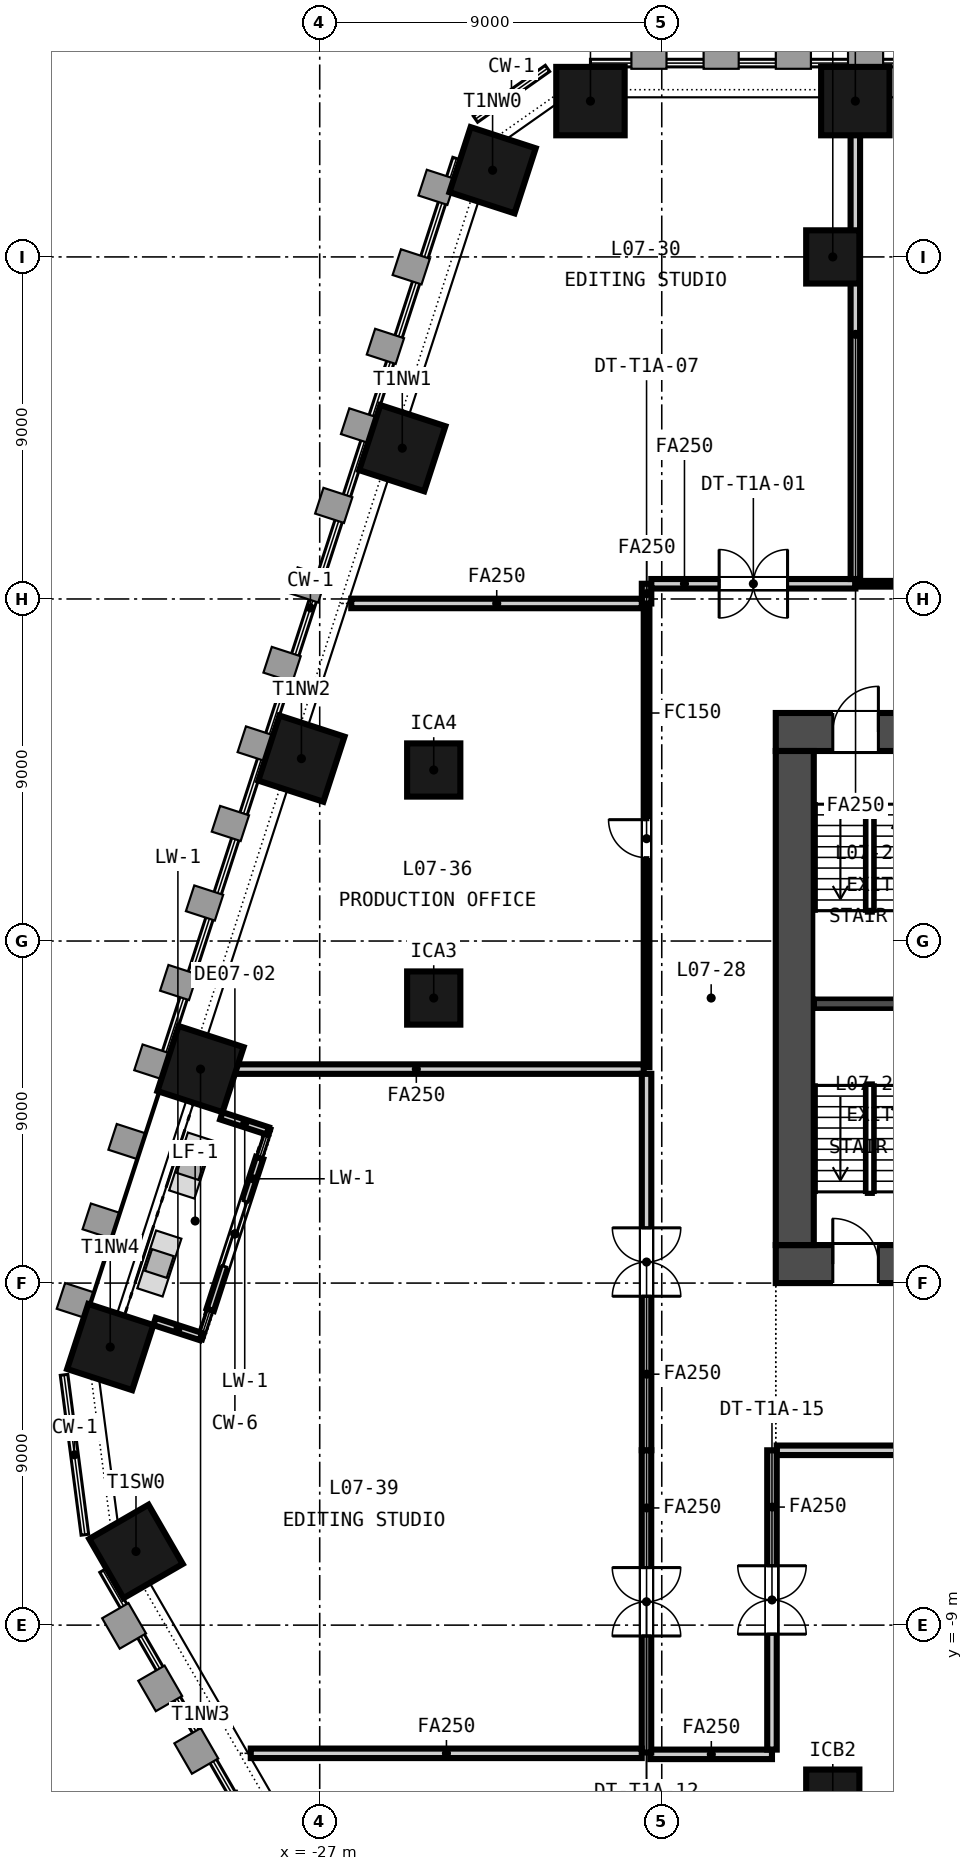
"""IFC4 building model, lengths in metres.
Left out: names, types, materials, properties, quantities, classifications, styles, units other than length and angle.
Written with IfcOpenShell. Run it as: python <this file> out.ifc"""

import sys

from ifc_helpers import new_model, si_unit, direction, frame, frame_2d, origin, origin_2d, place, context, subcontext, project, spatial, rectangle, extrude, element, fill, save


model = new_model("IFC4")
c1 = context("Model", 3, precision=1e-05, world=origin(), true_north=direction((0.0, 1.0)))
c2 = subcontext(c1, "Body", "Model", "MODEL_VIEW")
j1 = project(units=[si_unit("LENGTHUNIT", "METRE"), si_unit("PLANEANGLEUNIT", "RADIAN")], contexts=[c1])
p1 = place(None, origin())
s1 = spatial("IfcSite", under=j1, at=p1, CompositionType="ELEMENT")
p2 = place(p1, origin())
s2 = spatial("IfcBuilding", under=s1, at=p2, CompositionType="ELEMENT")
p3 = place(p2, frame((0.0, 0.0, 39.65)))
s3 = spatial("IfcBuildingStorey", under=s2, at=p3, CompositionType="ELEMENT", Elevation=39.65)
p4 = place(p3, frame((-15.0, 0.5, -0.15), z_axis=(0.0, 0.0, 1.0), x_axis=(1.0, 0.0, 0.0)))
e1 = element("IfcWall", 1, at=p4, inside=s3, PredefinedType="SOLIDWALL", context=c2, shape_type="SweptSolid", body=[
    extrude(rectangle(XDim=30.0, YDim=1.0, at=frame_2d((15.0, 0.0))), origin(), (0.0, 0.0, 1.0), 3.65),
])
p5 = place(p4, frame((5.8, 0.0, 0.15)))
e2 = element("IfcOpeningElement", 2, at=p5, cuts=e1, PredefinedType="OPENING", context=c2, shape_type="SweptSolid", body=[
    extrude(rectangle(XDim=2.4, YDim=2.4, at=frame_2d((1.2, 1.2))), frame((0.0, 0.51, 0.0), z_axis=(0.0, -1.0, 0.0), x_axis=(1.0, 0.0, 0.0)), (0.0, 0.0, 1.0), 1.02),
])
p6 = place(p4, frame((13.8, 0.0, 0.15)))
e3 = element("IfcOpeningElement", 3, at=p6, cuts=e1, PredefinedType="OPENING", context=c2, shape_type="SweptSolid", body=[
    extrude(rectangle(XDim=2.4, YDim=2.4, at=frame_2d((1.2, 1.2))), frame((0.0, 0.51, 0.0), z_axis=(0.0, -1.0, 0.0), x_axis=(1.0, 0.0, 0.0)), (0.0, 0.0, 1.0), 1.02),
])
p7 = place(p4, frame((21.8, 0.0, 0.15)))
e4 = element("IfcOpeningElement", 4, at=p7, cuts=e1, PredefinedType="OPENING", context=c2, shape_type="SweptSolid", body=[
    extrude(rectangle(XDim=2.4, YDim=2.4, at=frame_2d((1.2, 1.2))), frame((0.0, 0.51, 0.0), z_axis=(0.0, -1.0, 0.0), x_axis=(1.0, 0.0, 0.0)), (0.0, 0.0, 1.0), 1.02),
])
p8 = place(p4, frame((1.5, 0.0, 0.15)))
e5 = element("IfcOpeningElement", 5, at=p8, cuts=e1, PredefinedType="OPENING", context=c2, shape_type="SweptSolid", body=[
    extrude(rectangle(XDim=1.2, YDim=2.1, at=frame_2d((0.6, 1.05))), frame((0.0, 0.51, 0.0), z_axis=(0.0, -1.0, 0.0), x_axis=(1.0, 0.0, 0.0)), (0.0, 0.0, 1.0), 1.02),
])
p9 = place(p4, frame((27.3, 0.0, 0.15)))
e6 = element("IfcOpeningElement", 6, at=p9, cuts=e1, PredefinedType="OPENING", context=c2, shape_type="SweptSolid", body=[
    extrude(rectangle(XDim=1.2, YDim=2.1, at=frame_2d((0.6, 1.05))), frame((0.0, 0.51, 0.0), z_axis=(0.0, -1.0, 0.0), x_axis=(1.0, 0.0, 0.0)), (0.0, 0.0, 1.0), 1.02),
])
p10 = place(p3, frame((-15.0, 14.5, -0.15), z_axis=(0.0, 0.0, 1.0), x_axis=(1.0, 0.0, 0.0)))
e7 = element("IfcWall", 7, at=p10, inside=s3, PredefinedType="SOLIDWALL", context=c2, shape_type="SweptSolid", body=[
    extrude(rectangle(XDim=30.0, YDim=1.0, at=frame_2d((15.0, 0.0))), origin(), (0.0, 0.0, 1.0), 3.65),
])
p11 = place(p10, frame((9.25, 0.0, 0.15)))
e8 = element("IfcOpeningElement", 8, at=p11, cuts=e7, PredefinedType="OPENING", context=c2, shape_type="SweptSolid", body=[
    extrude(rectangle(XDim=1.5, YDim=2.1, at=frame_2d((0.75, 1.05))), frame((0.0, 0.51, 0.0), z_axis=(0.0, -1.0, 0.0), x_axis=(1.0, 0.0, 0.0)), (0.0, 0.0, 1.0), 1.02),
])
p12 = place(p10, frame((19.4, 0.0, 0.15)))
e9 = element("IfcOpeningElement", 9, at=p12, cuts=e7, PredefinedType="OPENING", context=c2, shape_type="SweptSolid", body=[
    extrude(rectangle(XDim=1.5, YDim=2.1, at=frame_2d((0.75, 1.05))), frame((0.0, 0.51, 0.0), z_axis=(0.0, -1.0, 0.0), x_axis=(1.0, 0.0, 0.0)), (0.0, 0.0, 1.0), 1.02),
])
p13 = place(p10, frame((1.5, 0.0, 0.15)))
e10 = element("IfcOpeningElement", 10, at=p13, cuts=e7, PredefinedType="OPENING", context=c2, shape_type="SweptSolid", body=[
    extrude(rectangle(XDim=1.2, YDim=2.1, at=frame_2d((0.6, 1.05))), frame((0.0, 0.51, 0.0), z_axis=(0.0, -1.0, 0.0), x_axis=(1.0, 0.0, 0.0)), (0.0, 0.0, 1.0), 1.02),
])
p14 = place(p10, frame((27.3, 0.0, 0.15)))
e11 = element("IfcOpeningElement", 11, at=p14, cuts=e7, PredefinedType="OPENING", context=c2, shape_type="SweptSolid", body=[
    extrude(rectangle(XDim=1.2, YDim=2.1, at=frame_2d((0.6, 1.05))), frame((0.0, 0.51, 0.0), z_axis=(0.0, -1.0, 0.0), x_axis=(1.0, 0.0, 0.0)), (0.0, 0.0, 1.0), 1.02),
])
p15 = place(p3, frame((-14.5, 1.0, -0.15), z_axis=(0.0, 0.0, 1.0), x_axis=(0.0, 1.0, 0.0)))
e12 = element("IfcWall", 12, at=p15, inside=s3, PredefinedType="SOLIDWALL", context=c2, shape_type="SweptSolid", body=[
    extrude(rectangle(XDim=13.0, YDim=1.0, at=frame_2d((6.5, 0.0))), origin(), (0.0, 0.0, 1.0), 3.65),
])
for number, where, z_axis, x_axis in (
    (13, (-12.907, 31.1, -0.15), (0.0, 0.0, 1.0), (-1.0, 0.0, 0.0)),
    (14, (-19.876, 31.1, -0.15), (0.0, 0.0, 1.0), (-1.0, 0.0, 0.0)),
    (15, (-22.451, 29.281, -0.15), (0.0, 0.0, 1.0), (-0.309, -0.951, 0.0)),
    (16, (-24.827, 21.968, -0.15), (0.0, 0.0, 1.0), (-0.309, -0.951, 0.0)),
    (17, (-27.482, 13.799, -0.15), (0.0, 0.0, 1.0), (-0.309, -0.951, 0.0)),
    (18, (-30.136, 5.63, -0.15), (0.0, 0.0, 1.0), (-0.309, -0.951, 0.0)),
    (19, (-32.512, -1.683, -0.15), (0.0, 0.0, 1.0), (-0.309, -0.951, 0.0)),
    (20, (-31.834, -7.061, -0.15), (0.0, 0.0, 1.0), (0.5, -0.866, 0.0)),
):
    element("IfcColumn", number, at=place(p3, frame(where, z_axis=z_axis, x_axis=x_axis)), inside=s3, PredefinedType="COLUMN", context=c2, shape_type="SweptSolid", body=[
        extrude(rectangle(XDim=1.8, YDim=1.8, at=origin_2d()), origin(), (0.0, 0.0, 1.0), 3.65),
    ])
for number, where, z_axis, x_axis in (
    (21, (-24.0, 7.5, -0.15), (0.0, 0.0, 1.0), (1.0, 0.0, 0.0)),
    (22, (-24.0, 13.5, -0.15), (0.0, 0.0, 1.0), (1.0, 0.0, 0.0)),
    (23, (-13.5, -13.5, -0.15), (0.0, 0.0, 1.0), (1.0, 0.0, 0.0)),
    (24, (-13.5, 27.0, -0.15), (0.0, 0.0, 1.0), (1.0, 0.0, 0.0)),
):
    element("IfcColumn", number, at=place(p3, frame(where, z_axis=z_axis, x_axis=x_axis)), inside=s3, PredefinedType="COLUMN", context=c2, shape_type="SweptSolid", body=[
        extrude(rectangle(XDim=1.4, YDim=1.4, at=origin_2d()), origin(), (0.0, 0.0, 1.0), 3.65),
    ])
p16 = place(p3, frame((-28.583, 3.291, 0.0), z_axis=(0.0, 0.0, 1.0), x_axis=(-0.30901640812, -0.951056706781, 0.0)))
e25 = element("IfcWall", 25, at=p16, inside=s3, PredefinedType="SOLIDWALL", context=c2, shape_type="SweptSolid", body=[
    extrude(rectangle(XDim=4.2, YDim=0.2, at=frame_2d((2.1, 0.0))), origin(), (0.0, 0.0, 1.0), 2.9),
])
p17 = place(p16, frame((1.2, 0.0, 0.0)))
e26 = element("IfcOpeningElement", 26, at=p17, cuts=e25, PredefinedType="OPENING", context=c2, shape_type="SweptSolid", body=[
    extrude(rectangle(XDim=1.8, YDim=2.4, at=frame_2d((0.9, 1.2))), frame((0.0, 0.11, 0.0), z_axis=(0.0, -1.0, 0.0), x_axis=(1.0, 0.0, 0.0)), (0.0, 0.0, 1.0), 0.22),
])
p18 = place(p3, frame((-29.589, 4.401, 0.0), z_axis=(0.0, 0.0, 1.0), x_axis=(0.951052235057, -0.30903017036, 0.0)))
e27 = element("IfcWall", 27, at=p18, inside=s3, PredefinedType="SOLIDWALL", context=c2, shape_type="SweptSolid", body=[
    extrude(rectangle(XDim=1.284, YDim=0.2, at=frame_2d((0.642, 0.0))), origin(), (0.0, 0.0, 1.0), 3.05),
])
p19 = place(p3, frame((-31.347, -1.01, 0.0), z_axis=(0.0, 0.0, 1.0), x_axis=(0.951070391529, -0.308974287532, 0.0)))
e28 = element("IfcWall", 28, at=p19, inside=s3, PredefinedType="SOLIDWALL", context=c2, shape_type="SweptSolid", body=[
    extrude(rectangle(XDim=1.284, YDim=0.2, at=frame_2d((0.642, 0.0))), origin(), (0.0, 0.0, 1.0), 3.05),
])
p20 = place(p3, frame((-14.0, 7.35, -0.15), z_axis=(0.0, 0.0, 1.0), x_axis=(1.0, 0.0, 0.0)))
e29 = element("IfcWall", 29, at=p20, inside=s3, PredefinedType="SOLIDWALL", context=c2, shape_type="SweptSolid", body=[
    extrude(rectangle(XDim=2.95, YDim=0.3, at=frame_2d((1.475, 0.0))), origin(), (0.0, 0.0, 1.0), 3.65),
])
p21 = place(p3, frame((10.192, -4.4, 0.0), z_axis=(0.0, 0.0, 1.0), x_axis=(-1.0, 0.0, 0.0)))
e30 = element("IfcWall", 30, at=p21, inside=s3, PredefinedType="PARTITIONING", context=c2, shape_type="SweptSolid", body=[
    extrude(rectangle(XDim=25.167, YDim=0.25, at=frame_2d((12.583, 0.0))), origin(), (0.0, 0.0, 1.0), 2.741),
])
p22 = place(p21, frame((11.696, 0.0, 0.0)))
e31 = element("IfcOpeningElement", 31, at=p22, cuts=e30, PredefinedType="OPENING", context=c2, shape_type="SweptSolid", body=[
    extrude(rectangle(XDim=1.8, YDim=2.1, at=frame_2d((0.9, 1.05))), frame((0.0, 0.135, 0.0), z_axis=(0.0, -1.0, 0.0), x_axis=(1.0, 0.0, 0.0)), (0.0, 0.0, 1.0), 0.27),
])
p23 = place(p3, frame((-15.1, -12.4, 0.0), z_axis=(0.0, 0.0, 1.0), x_axis=(-1.0, 0.0, 0.0)))
e32 = element("IfcWall", 32, at=p23, inside=s3, PredefinedType="PARTITIONING", context=c2, shape_type="SweptSolid", body=[
    extrude(rectangle(XDim=3.202, YDim=0.25, at=frame_2d((1.601, 0.0))), origin(), (0.0, 0.0, 1.0), 2.741),
])
p24 = place(p3, frame((-15.1, -4.4, 0.0), z_axis=(0.0, 0.0, 1.0), x_axis=(0.0, -1.0, 0.0)))
e33 = element("IfcWall", 33, at=p24, inside=s3, PredefinedType="PARTITIONING", context=c2, shape_type="SweptSolid", body=[
    extrude(rectangle(XDim=7.875, YDim=0.25, at=frame_2d((3.938, 0.0))), origin(), (0.0, 0.0, 1.0), 2.741),
])
p25 = place(p24, frame((3.038, 0.0, 0.0)))
e34 = element("IfcOpeningElement", 34, at=p25, cuts=e33, PredefinedType="OPENING", context=c2, shape_type="SweptSolid", body=[
    extrude(rectangle(XDim=1.8, YDim=2.1, at=frame_2d((0.9, 1.05))), frame((0.0, 0.135, 0.0), z_axis=(0.0, -1.0, 0.0), x_axis=(1.0, 0.0, 0.0)), (0.0, 0.0, 1.0), 0.27),
])
p26 = place(p3, frame((-18.4, 17.881, 0.0), z_axis=(0.0, 0.0, 1.0), x_axis=(0.0, 1.0, 0.0)))
e35 = element("IfcWall", 35, at=p26, inside=s3, PredefinedType="PARTITIONING", context=c2, shape_type="SweptSolid", body=[
    extrude(rectangle(XDim=0.519, YDim=0.25, at=frame_2d((0.259, 0.0))), origin(), (0.0, 0.0, 1.0), 2.741),
])
p27 = place(p3, frame((-18.275, 18.4, 0.0), z_axis=(0.0, 0.0, 1.0), x_axis=(1.0, 0.0, 0.0)))
e36 = element("IfcWall", 36, at=p27, inside=s3, PredefinedType="PARTITIONING", context=c2, shape_type="SweptSolid", body=[
    extrude(rectangle(XDim=5.37, YDim=0.25, at=frame_2d((2.685, 0.0))), origin(), (0.0, 0.0, 1.0), 2.741),
])
p28 = place(p27, frame((1.785, 0.0, 0.0)))
e37 = element("IfcOpeningElement", 37, at=p28, cuts=e36, PredefinedType="OPENING", context=c2, shape_type="SweptSolid", body=[
    extrude(rectangle(XDim=1.8, YDim=2.1, at=frame_2d((0.9, 1.05))), frame((0.0, 0.135, 0.0), z_axis=(0.0, -1.0, 0.0), x_axis=(1.0, 0.0, 0.0)), (0.0, 0.0, 1.0), 0.27),
])
p29 = place(p3, frame((-26.17, 17.883, 0.0), z_axis=(0.0, 0.0, 1.0), x_axis=(0.999999975014, -0.00022354218, 0.0)))
e38 = element("IfcWall", 38, at=p29, inside=s3, PredefinedType="PARTITIONING", context=c2, shape_type="SweptSolid", body=[
    extrude(rectangle(XDim=7.645, YDim=0.25, at=frame_2d((3.823, 0.0))), origin(), (0.0, 0.0, 1.0), 2.741),
])
p30 = place(p3, frame((-12.905, 18.4, 0.0), z_axis=(0.0, 0.0, 1.0), x_axis=(1.0, 0.0, 0.0)))
e39 = element("IfcWall", 39, at=p30, inside=s3, PredefinedType="PARTITIONING", context=c2, shape_type="SweptSolid", body=[
    extrude(rectangle(XDim=7.868, YDim=0.15, at=frame_2d((3.934, 0.0))), origin(), (0.0, 0.0, 1.0), 2.741),
])
p31 = place(p30, frame((3.434, 0.0, 0.0)))
e40 = element("IfcOpeningElement", 40, at=p31, cuts=e39, PredefinedType="OPENING", context=c2, shape_type="SweptSolid", body=[
    extrude(rectangle(XDim=1.0, YDim=2.1, at=frame_2d((0.5, 1.05))), frame((0.0, 0.085, 0.0), z_axis=(0.0, -1.0, 0.0), x_axis=(1.0, 0.0, 0.0)), (0.0, 0.0, 1.0), 0.17),
])
p32 = place(p3, frame((-12.907, 31.4, 0.0), z_axis=(0.0, 0.0, 1.0), x_axis=(0.000151699027, -0.999999988494, 0.0)))
e41 = element("IfcWall", 41, at=p32, inside=s3, PredefinedType="PARTITIONING", context=c2, shape_type="SweptSolid", body=[
    extrude(rectangle(XDim=12.875, YDim=0.25, at=frame_2d((6.438, 0.0))), origin(), (0.0, 0.0, 1.0), 2.741),
])
p33 = place(p3, frame((-18.4, 5.68, 0.0), z_axis=(0.0, 0.0, 1.0), x_axis=(0.0, 1.0, 0.0)))
e42 = element("IfcWall", 42, at=p33, inside=s3, PredefinedType="PARTITIONING", context=c2, shape_type="SweptSolid", body=[
    extrude(rectangle(XDim=12.076, YDim=0.15, at=frame_2d((6.038, 0.0))), origin(), (0.0, 0.0, 1.0), 2.741),
])
p34 = place(p33, frame((5.513, 0.0, 0.0)))
e43 = element("IfcOpeningElement", 43, at=p34, cuts=e42, PredefinedType="OPENING", context=c2, shape_type="SweptSolid", body=[
    extrude(rectangle(XDim=1.0, YDim=2.1, at=frame_2d((0.5, 1.05))), frame((0.0, 0.085, 0.0), z_axis=(0.0, -1.0, 0.0), x_axis=(1.0, 0.0, 0.0)), (0.0, 0.0, 1.0), 0.17),
])
p35 = place(p3, frame((-30.451, 5.63, 0.0), z_axis=(0.0, 0.0, 1.0), x_axis=(1.0, 0.0, 0.0)))
e44 = element("IfcWall", 44, at=p35, inside=s3, PredefinedType="PARTITIONING", context=c2, shape_type="SweptSolid", body=[
    extrude(rectangle(XDim=11.976, YDim=0.25, at=frame_2d((5.988, 0.0))), origin(), (0.0, 0.0, 1.0), 2.741),
])
p36 = place(p3, frame((-18.402, -12.352, 0.0), z_axis=(0.0, 0.0, 1.0), x_axis=(0.0, 1.0, 0.0)))
e45 = element("IfcWall", 45, at=p36, inside=s3, PredefinedType="PARTITIONING", context=c2, shape_type="SweptSolid", body=[
    extrude(rectangle(XDim=7.954, YDim=0.25, at=frame_2d((3.977, 0.0))), origin(), (0.0, 0.0, 1.0), 2.741),
])
p37 = place(p36, frame((3.066, 0.0, 0.0)))
e46 = element("IfcOpeningElement", 46, at=p37, cuts=e45, PredefinedType="OPENING", context=c2, shape_type="SweptSolid", body=[
    extrude(rectangle(XDim=1.8, YDim=2.1, at=frame_2d((0.9, 1.05))), frame((0.0, 0.135, 0.0), z_axis=(0.0, -1.0, 0.0), x_axis=(1.0, 0.0, 0.0)), (0.0, 0.0, 1.0), 0.27),
])
p38 = place(p3, frame((-18.4, -4.398, 0.0), z_axis=(0.0, 0.0, 1.0), x_axis=(0.0, 1.0, 0.0)))
e47 = element("IfcWall", 47, at=p38, inside=s3, PredefinedType="PARTITIONING", context=c2, shape_type="SweptSolid", body=[
    extrude(rectangle(XDim=9.903, YDim=0.25, at=frame_2d((4.951, 0.0))), origin(), (0.0, 0.0, 1.0), 2.741),
])
p39 = place(p38, frame((4.052, 0.0, 0.0)))
e48 = element("IfcOpeningElement", 48, at=p39, cuts=e47, PredefinedType="OPENING", context=c2, shape_type="SweptSolid", body=[
    extrude(rectangle(XDim=1.8, YDim=2.1, at=frame_2d((0.9, 1.05))), frame((0.0, 0.135, 0.0), z_axis=(0.0, -1.0, 0.0), x_axis=(1.0, 0.0, 0.0)), (0.0, 0.0, 1.0), 0.27),
])
p40 = place(p3, frame((-28.814, -12.373, 0.0), z_axis=(0.0, 0.0, 1.0), x_axis=(1.0, 0.0, 0.0)))
e49 = element("IfcWall", 49, at=p40, inside=s3, PredefinedType="PARTITIONING", context=c2, shape_type="SweptSolid", body=[
    extrude(rectangle(XDim=10.287, YDim=0.25, at=frame_2d((5.144, 0.0))), origin(), (0.0, 0.0, 1.0), 2.741),
])
p41 = place(p17, origin())
e50 = element("IfcDoor", 50, at=p41, inside=s3, OperationType="SINGLE_SWING_LEFT", PredefinedType="DOOR", context=c2, shape_type="SweptSolid", body=[
    extrude(rectangle(XDim=1.8, YDim=2.4, at=frame_2d((0.9, 1.2))), frame((0.0, 0.025, 0.0), z_axis=(0.0, -1.0, 0.0), x_axis=(1.0, 0.0, 0.0)), (0.0, 0.0, 1.0), 0.05),
])
fill(e26, e50)
p42 = place(p13, origin())
e51 = element("IfcDoor", 51, at=p42, inside=s3, OperationType="SINGLE_SWING_RIGHT", PredefinedType="DOOR", context=c2, shape_type="SweptSolid", body=[
    extrude(rectangle(XDim=1.2, YDim=2.1, at=frame_2d((0.6, 1.05))), frame((0.0, 0.025, 0.0), z_axis=(0.0, -1.0, 0.0), x_axis=(1.0, 0.0, 0.0)), (0.0, 0.0, 1.0), 0.05),
])
fill(e10, e51)
p43 = place(p8, origin())
e52 = element("IfcDoor", 52, at=p43, inside=s3, OperationType="SINGLE_SWING_LEFT", PredefinedType="DOOR", context=c2, shape_type="SweptSolid", body=[
    extrude(rectangle(XDim=1.2, YDim=2.1, at=frame_2d((0.6, 1.05))), frame((0.0, 0.025, 0.0), z_axis=(0.0, -1.0, 0.0), x_axis=(1.0, 0.0, 0.0)), (0.0, 0.0, 1.0), 0.05),
])
fill(e5, e52)
p44 = place(p28, origin())
e53 = element("IfcDoor", 53, at=p44, inside=s3, OperationType="DOUBLE_DOOR_DOUBLE_SWING", PredefinedType="DOOR", context=c2, shape_type="SweptSolid", body=[
    extrude(rectangle(XDim=1.8, YDim=2.1, at=frame_2d((0.9, 1.05))), frame((0.0, 0.025, 0.0), z_axis=(0.0, -1.0, 0.0), x_axis=(1.0, 0.0, 0.0)), (0.0, 0.0, 1.0), 0.05),
])
fill(e37, e53)
p45 = place(p34, origin())
e54 = element("IfcDoor", 54, at=p45, inside=s3, OperationType="SINGLE_SWING_RIGHT", PredefinedType="DOOR", context=c2, shape_type="SweptSolid", body=[
    extrude(rectangle(XDim=1.0, YDim=2.1, at=frame_2d((0.5, 1.05))), frame((0.0, 0.025, 0.0), z_axis=(0.0, -1.0, 0.0), x_axis=(1.0, 0.0, 0.0)), (0.0, 0.0, 1.0), 0.05),
])
fill(e43, e54)
p46 = place(p39, origin())
e55 = element("IfcDoor", 55, at=p46, inside=s3, OperationType="DOUBLE_DOOR_DOUBLE_SWING", PredefinedType="DOOR", context=c2, shape_type="SweptSolid", body=[
    extrude(rectangle(XDim=1.8, YDim=2.1, at=frame_2d((0.9, 1.05))), frame((0.0, 0.025, 0.0), z_axis=(0.0, -1.0, 0.0), x_axis=(1.0, 0.0, 0.0)), (0.0, 0.0, 1.0), 0.05),
])
fill(e48, e55)
p47 = place(p37, origin())
e56 = element("IfcDoor", 56, at=p47, inside=s3, OperationType="DOUBLE_DOOR_DOUBLE_SWING", PredefinedType="DOOR", context=c2, shape_type="SweptSolid", body=[
    extrude(rectangle(XDim=1.8, YDim=2.1, at=frame_2d((0.9, 1.05))), frame((0.0, 0.025, 0.0), z_axis=(0.0, -1.0, 0.0), x_axis=(1.0, 0.0, 0.0)), (0.0, 0.0, 1.0), 0.05),
])
fill(e46, e56)
p48 = place(p25, origin())
e57 = element("IfcDoor", 57, at=p48, inside=s3, OperationType="DOUBLE_DOOR_DOUBLE_SWING", PredefinedType="DOOR", context=c2, shape_type="SweptSolid", body=[
    extrude(rectangle(XDim=1.8, YDim=2.1, at=frame_2d((0.9, 1.05))), frame((0.0, 0.025, 0.0), z_axis=(0.0, -1.0, 0.0), x_axis=(1.0, 0.0, 0.0)), (0.0, 0.0, 1.0), 0.05),
])
fill(e34, e57)
save(model, sys.argv[1])
